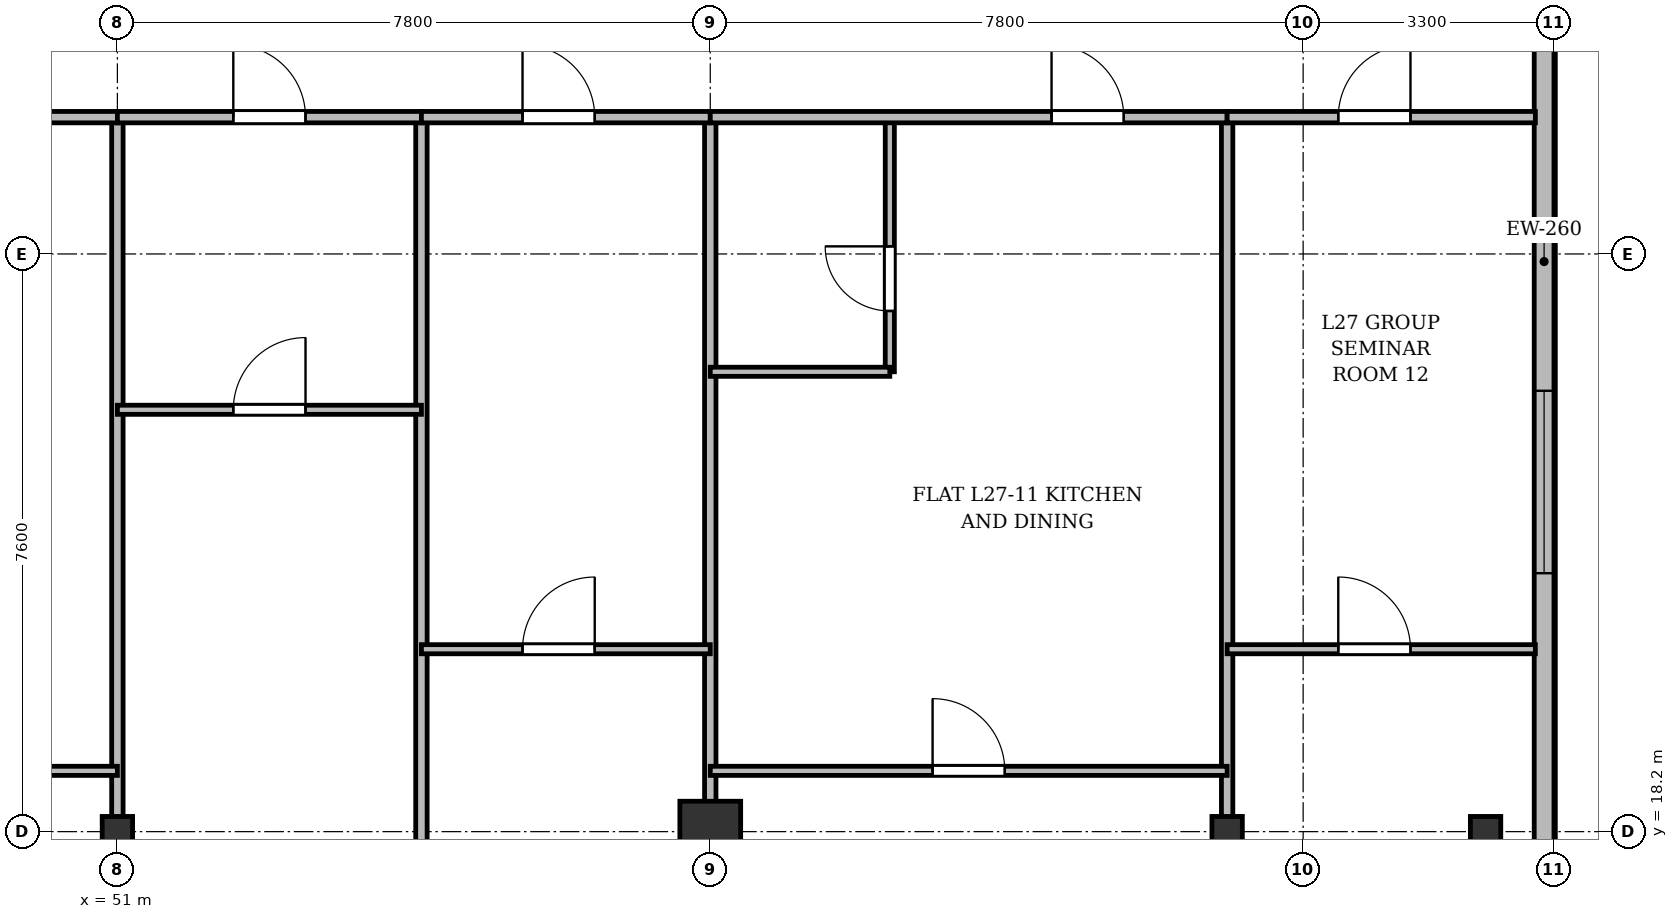
"""IFC4 building model, lengths in metres.
Left out: names, types, materials, properties, quantities, classifications, styles, units other than length and angle.
Written with IfcOpenShell. Run it as: python <this file> out.ifc"""

import sys

from ifc_helpers import new_model, si_unit, direction, frame, frame_2d, origin, origin_2d, place, context, subcontext, project, spatial, rectangle, i_section, extrude, source, transform, mapped, element, fill, save


model = new_model("IFC4")
c1 = context("Model", 3, precision=1e-05, world=origin(), true_north=direction((0.0, 1.0)))
c2 = subcontext(c1, "Body", "Model", "MODEL_VIEW")
j1 = project(units=[si_unit("LENGTHUNIT", "METRE"), si_unit("PLANEANGLEUNIT", "RADIAN")], contexts=[c1])
p1 = place(None, origin())
s1 = spatial("IfcSite", under=j1, at=p1, CompositionType="ELEMENT")
p2 = place(p1, origin())
s2 = spatial("IfcBuilding", under=s1, at=p2, CompositionType="ELEMENT")
p3 = place(p2, frame((0.0, 0.0, 106.9)))
s3 = spatial("IfcBuildingStorey", under=s2, at=p3, CompositionType="ELEMENT", Elevation=106.9)
m1 = source(origin(), c2, "Body", "SweptSolid", [
    extrude(i_section(OverallWidth=0.4, OverallDepth=0.4, WebThickness=0.022, FlangeThickness=0.035, at=origin_2d()), origin(), (0.0, 0.0, 1.0), 3.6),
])
p4 = place(p3, frame((51.0, 18.2, 0.0), z_axis=(0.0, 0.0, 1.0), x_axis=(1.0, 0.0, 0.0)))
e1 = element("IfcColumn", 1, at=p4, inside=s3, PredefinedType="COLUMN", context=c2, shape_type="MappedRepresentation", body=[
    mapped(m1, transform((0.0, 0.0, 0.0), x_axis=(1.0, 0.0, 0.0), y_axis=(0.0, 1.0, 0.0), z_axis=(0.0, 0.0, 1.0), scale=1.0)),
])
m2 = source(origin(), c2, "Body", "SweptSolid", [
    extrude(rectangle(XDim=0.8, YDim=0.8, at=origin_2d()), origin(), (0.0, 0.0, 1.0), 3.6),
])
p5 = place(p3, frame((58.8, 18.2, 0.0), z_axis=(0.0, 0.0, 1.0), x_axis=(1.0, 0.0, 0.0)))
e2 = element("IfcColumn", 2, at=p5, inside=s3, PredefinedType="COLUMN", context=c2, shape_type="MappedRepresentation", body=[
    mapped(m2, transform((0.0, 0.0, 0.0), x_axis=(1.0, 0.0, 0.0), y_axis=(0.0, 1.0, 0.0), z_axis=(0.0, 0.0, 1.0), scale=1.0)),
])
for number, where, z_axis, x_axis in (
    (3, (65.6, 18.2, 0.0), (0.0, 0.0, 1.0), (1.0, 0.0, 0.0)),
    (4, (69.0, 18.2, 0.0), (0.0, 0.0, 1.0), (1.0, 0.0, 0.0)),
):
    element("IfcColumn", number, at=place(p3, frame(where, z_axis=z_axis, x_axis=x_axis)), inside=s3, PredefinedType="COLUMN", context=c2, shape_type="MappedRepresentation", body=[
        mapped(m1, transform((0.0, 0.0, 0.0), x_axis=(1.0, 0.0, 0.0), y_axis=(0.0, 1.0, 0.0), z_axis=(0.0, 0.0, 1.0), scale=1.0)),
    ])
p6 = place(p3, frame((69.77, 45.5, 0.0), z_axis=(0.0, 0.0, 1.0), x_axis=(0.0, -1.0, 0.0)))
e5 = element("IfcWall", 5, at=p6, inside=s3, PredefinedType="SOLIDWALL", context=c2, shape_type="SweptSolid", body=[
    extrude(rectangle(XDim=39.6, YDim=0.26, at=frame_2d((19.8, 0.0))), origin(), (0.0, 0.0, 1.0), 3.34),
])
p7 = place(p6, frame((36.95, 0.0, 0.92)))
e6 = element("IfcOpeningElement", 6, at=p7, cuts=e5, PredefinedType="OPENING", context=c2, shape_type="SweptSolid", body=[
    extrude(rectangle(XDim=1.2, YDim=1.65, at=frame_2d((0.6, 0.825))), frame((0.0, 0.14, 0.0), z_axis=(0.0, -1.0, 0.0), x_axis=(1.0, 0.0, 0.0)), (0.0, 0.0, 1.0), 0.28),
])
p8 = place(p6, frame((32.9, 0.0, 0.92)))
e7 = element("IfcOpeningElement", 7, at=p8, cuts=e5, PredefinedType="OPENING", context=c2, shape_type="SweptSolid", body=[
    extrude(rectangle(XDim=2.4, YDim=2.1, at=frame_2d((1.2, 1.05))), frame((0.0, 0.14, 0.0), z_axis=(0.0, -1.0, 0.0), x_axis=(1.0, 0.0, 0.0)), (0.0, 0.0, 1.0), 0.28),
])
p9 = place(p6, frame((28.7, 0.0, 0.92)))
e8 = element("IfcOpeningElement", 8, at=p9, cuts=e5, PredefinedType="OPENING", context=c2, shape_type="SweptSolid", body=[
    extrude(rectangle(XDim=2.4, YDim=2.1, at=frame_2d((1.2, 1.05))), frame((0.0, 0.14, 0.0), z_axis=(0.0, -1.0, 0.0), x_axis=(1.0, 0.0, 0.0)), (0.0, 0.0, 1.0), 0.28),
])
p10 = place(p6, frame((21.5, 0.0, 0.92)))
e9 = element("IfcOpeningElement", 9, at=p10, cuts=e5, PredefinedType="OPENING", context=c2, shape_type="SweptSolid", body=[
    extrude(rectangle(XDim=2.4, YDim=2.1, at=frame_2d((1.2, 1.05))), frame((0.0, 0.14, 0.0), z_axis=(0.0, -1.0, 0.0), x_axis=(1.0, 0.0, 0.0)), (0.0, 0.0, 1.0), 0.28),
])
p11 = place(p6, frame((7.5, 0.0, 0.92)))
e10 = element("IfcOpeningElement", 10, at=p11, cuts=e5, PredefinedType="OPENING", context=c2, shape_type="SweptSolid", body=[
    extrude(rectangle(XDim=2.4, YDim=2.1, at=frame_2d((1.2, 1.05))), frame((0.0, 0.14, 0.0), z_axis=(0.0, -1.0, 0.0), x_axis=(1.0, 0.0, 0.0)), (0.0, 0.0, 1.0), 0.28),
])
p12 = place(p6, frame((4.5, 0.0, 0.92)))
e11 = element("IfcOpeningElement", 11, at=p12, cuts=e5, PredefinedType="OPENING", context=c2, shape_type="SweptSolid", body=[
    extrude(rectangle(XDim=1.2, YDim=1.65, at=frame_2d((0.6, 0.825))), frame((0.0, 0.14, 0.0), z_axis=(0.0, -1.0, 0.0), x_axis=(1.0, 0.0, 0.0)), (0.0, 0.0, 1.0), 0.28),
])
p13 = place(p6, frame((1.15, 0.0, 0.92)))
e12 = element("IfcOpeningElement", 12, at=p13, cuts=e5, PredefinedType="OPENING", context=c2, shape_type="SweptSolid", body=[
    extrude(rectangle(XDim=1.2, YDim=1.65, at=frame_2d((0.6, 0.825))), frame((0.0, 0.14, 0.0), z_axis=(0.0, -1.0, 0.0), x_axis=(1.0, 0.0, 0.0)), (0.0, 0.0, 1.0), 0.28),
])
p14 = place(p3, frame((51.0, 3.145, 0.0), z_axis=(0.0, 0.0, 1.0), x_axis=(0.0, 1.0, 0.0)))
e13 = element("IfcWall", 13, at=p14, inside=s3, PredefinedType="PARTITIONING", context=c2, shape_type="SweptSolid", body=[
    extrude(rectangle(XDim=24.455, YDim=0.15, at=frame_2d((12.228, 0.0))), origin(), (0.0, 0.0, 1.0), 2.84),
])
p15 = place(p3, frame((55.0, 3.145, 0.0), z_axis=(0.0, 0.0, 1.0), x_axis=(0.0, 1.0, 0.0)))
e14 = element("IfcWall", 14, at=p15, inside=s3, PredefinedType="PARTITIONING", context=c2, shape_type="SweptSolid", body=[
    extrude(rectangle(XDim=24.455, YDim=0.15, at=frame_2d((12.228, 0.0))), origin(), (0.0, 0.0, 1.0), 2.752),
])
for number, where, z_axis, x_axis in (
    (15, (58.8, 3.145, 0.0), (0.0, 0.0, 1.0), (0.0, 1.0, 0.0)),
    (16, (65.6, 3.145, 0.0), (0.0, 0.0, 1.0), (0.0, 1.0, 0.0)),
):
    element("IfcWall", number, at=place(p3, frame(where, z_axis=z_axis, x_axis=x_axis)), inside=s3, PredefinedType="PARTITIONING", context=c2, shape_type="SweptSolid", body=[
        extrude(rectangle(XDim=24.455, YDim=0.15, at=frame_2d((12.228, 0.0))), origin(), (0.0, 0.0, 1.0), 2.84),
    ])
p16 = place(p3, frame((43.8, 19.0, 0.0), z_axis=(0.0, 0.0, 1.0), x_axis=(1.0, 0.0, 0.0)))
e17 = element("IfcWall", 17, at=p16, inside=s3, PredefinedType="PARTITIONING", context=c2, shape_type="SweptSolid", body=[
    extrude(rectangle(XDim=7.2, YDim=0.12, at=frame_2d((3.6, 0.0))), origin(), (0.0, 0.0, 1.0), 2.84),
])
p17 = place(p16, frame((3.125, 0.0, 0.0)))
e18 = element("IfcOpeningElement", 18, at=p17, cuts=e17, PredefinedType="OPENING", context=c2, shape_type="SweptSolid", body=[
    extrude(rectangle(XDim=0.95, YDim=2.15, at=frame_2d((0.475, 1.075))), frame((0.0, 0.07, 0.0), z_axis=(0.0, -1.0, 0.0), x_axis=(1.0, 0.0, 0.0)), (0.0, 0.0, 1.0), 0.14),
])
p18 = place(p3, frame((43.8, 27.6, 0.0), z_axis=(0.0, 0.0, 1.0), x_axis=(1.0, 0.0, 0.0)))
e19 = element("IfcWall", 19, at=p18, inside=s3, PredefinedType="PARTITIONING", context=c2, shape_type="SweptSolid", body=[
    extrude(rectangle(XDim=7.2, YDim=0.15, at=frame_2d((3.6, 0.0))), origin(), (0.0, 0.0, 1.0), 2.84),
])
p19 = place(p18, frame((4.706, 0.0, 0.0)))
e20 = element("IfcOpeningElement", 20, at=p19, cuts=e19, PredefinedType="OPENING", context=c2, shape_type="SweptSolid", body=[
    extrude(rectangle(XDim=0.95, YDim=2.15, at=frame_2d((0.475, 1.075))), frame((0.0, 0.085, 0.0), z_axis=(0.0, -1.0, 0.0), x_axis=(1.0, 0.0, 0.0)), (0.0, 0.0, 1.0), 0.17),
])
p20 = place(p3, frame((51.0, 27.6, 0.0), z_axis=(0.0, 0.0, 1.0), x_axis=(1.0, 0.0, 0.0)))
e21 = element("IfcWall", 21, at=p20, inside=s3, PredefinedType="PARTITIONING", context=c2, shape_type="SweptSolid", body=[
    extrude(rectangle(XDim=4.0, YDim=0.15, at=frame_2d((2.0, 0.0))), origin(), (0.0, 0.0, 1.0), 2.84),
])
p21 = place(p20, frame((1.525, 0.0, 0.0)))
e22 = element("IfcOpeningElement", 22, at=p21, cuts=e21, PredefinedType="OPENING", context=c2, shape_type="SweptSolid", body=[
    extrude(rectangle(XDim=0.95, YDim=2.15, at=frame_2d((0.475, 1.075))), frame((0.0, 0.085, 0.0), z_axis=(0.0, -1.0, 0.0), x_axis=(1.0, 0.0, 0.0)), (0.0, 0.0, 1.0), 0.17),
])
p22 = place(p3, frame((51.0, 23.75, 0.0), z_axis=(0.0, 0.0, 1.0), x_axis=(1.0, 0.0, 0.0)))
e23 = element("IfcWall", 23, at=p22, inside=s3, PredefinedType="PARTITIONING", context=c2, shape_type="SweptSolid", body=[
    extrude(rectangle(XDim=4.0, YDim=0.12, at=frame_2d((2.0, 0.0))), origin(), (0.0, 0.0, 1.0), 2.84),
])
p23 = place(p22, frame((1.525, 0.0, 0.0)))
e24 = element("IfcOpeningElement", 24, at=p23, cuts=e23, PredefinedType="OPENING", context=c2, shape_type="SweptSolid", body=[
    extrude(rectangle(XDim=0.95, YDim=2.15, at=frame_2d((0.475, 1.075))), frame((0.0, 0.07, 0.0), z_axis=(0.0, -1.0, 0.0), x_axis=(1.0, 0.0, 0.0)), (0.0, 0.0, 1.0), 0.14),
])
p24 = place(p3, frame((55.0, 27.6, 0.0), z_axis=(0.0, 0.0, 1.0), x_axis=(1.0, 0.0, 0.0)))
e25 = element("IfcWall", 25, at=p24, inside=s3, PredefinedType="PARTITIONING", context=c2, shape_type="SweptSolid", body=[
    extrude(rectangle(XDim=3.8, YDim=0.15, at=frame_2d((1.9, 0.0))), origin(), (0.0, 0.0, 1.0), 2.84),
])
p25 = place(p24, frame((1.33, 0.0, 0.0)))
e26 = element("IfcOpeningElement", 26, at=p25, cuts=e25, PredefinedType="OPENING", context=c2, shape_type="SweptSolid", body=[
    extrude(rectangle(XDim=0.95, YDim=2.15, at=frame_2d((0.475, 1.075))), frame((0.0, 0.085, 0.0), z_axis=(0.0, -1.0, 0.0), x_axis=(1.0, 0.0, 0.0)), (0.0, 0.0, 1.0), 0.17),
])
p26 = place(p3, frame((55.0, 20.6, 0.0), z_axis=(0.0, 0.0, 1.0), x_axis=(1.0, 0.0, 0.0)))
e27 = element("IfcWall", 27, at=p26, inside=s3, PredefinedType="PARTITIONING", context=c2, shape_type="SweptSolid", body=[
    extrude(rectangle(XDim=3.8, YDim=0.12, at=frame_2d((1.9, 0.0))), origin(), (0.0, 0.0, 1.0), 2.84),
])
p27 = place(p26, frame((1.33, 0.0, 0.0)))
e28 = element("IfcOpeningElement", 28, at=p27, cuts=e27, PredefinedType="OPENING", context=c2, shape_type="SweptSolid", body=[
    extrude(rectangle(XDim=0.95, YDim=2.15, at=frame_2d((0.475, 1.075))), frame((0.0, 0.07, 0.0), z_axis=(0.0, -1.0, 0.0), x_axis=(1.0, 0.0, 0.0)), (0.0, 0.0, 1.0), 0.14),
])
p28 = place(p3, frame((58.8, 19.0, 0.0), z_axis=(0.0, 0.0, 1.0), x_axis=(1.0, 0.0, 0.0)))
e29 = element("IfcWall", 29, at=p28, inside=s3, PredefinedType="PARTITIONING", context=c2, shape_type="SweptSolid", body=[
    extrude(rectangle(XDim=6.8, YDim=0.12, at=frame_2d((3.4, 0.0))), origin(), (0.0, 0.0, 1.0), 2.84),
])
p29 = place(p28, frame((2.925, 0.0, 0.0)))
e30 = element("IfcOpeningElement", 30, at=p29, cuts=e29, PredefinedType="OPENING", context=c2, shape_type="SweptSolid", body=[
    extrude(rectangle(XDim=0.95, YDim=2.15, at=frame_2d((0.475, 1.075))), frame((0.0, 0.07, 0.0), z_axis=(0.0, -1.0, 0.0), x_axis=(1.0, 0.0, 0.0)), (0.0, 0.0, 1.0), 0.14),
])
p30 = place(p3, frame((61.162, 24.25, 0.0), z_axis=(0.0, 0.0, 1.0), x_axis=(0.0, 1.0, 0.0)))
e31 = element("IfcWall", 31, at=p30, inside=s3, PredefinedType="PARTITIONING", context=c2, shape_type="SweptSolid", body=[
    extrude(rectangle(XDim=3.35, YDim=0.12, at=frame_2d((1.675, 0.0))), origin(), (0.0, 0.0, 1.0), 2.99),
])
p31 = place(p30, frame((0.8, 0.0, 0.0)))
e32 = element("IfcOpeningElement", 32, at=p31, cuts=e31, PredefinedType="OPENING", context=c2, shape_type="SweptSolid", body=[
    extrude(rectangle(XDim=0.85, YDim=2.1, at=frame_2d((0.425, 1.05))), frame((0.0, 0.07, 0.0), z_axis=(0.0, -1.0, 0.0), x_axis=(1.0, 0.0, 0.0)), (0.0, 0.0, 1.0), 0.14),
])
p32 = place(p3, frame((58.8, 24.25, 0.0), z_axis=(0.0, 0.0, 1.0), x_axis=(1.0, 0.0, 0.0)))
e33 = element("IfcWall", 33, at=p32, inside=s3, PredefinedType="PARTITIONING", context=c2, shape_type="SweptSolid", body=[
    extrude(rectangle(XDim=2.362, YDim=0.12, at=frame_2d((1.181, 0.0))), origin(), (0.0, 0.0, 1.0), 2.84),
])
p33 = place(p3, frame((58.8, 27.6, 0.0), z_axis=(0.0, 0.0, 1.0), x_axis=(1.0, 0.0, 0.0)))
e34 = element("IfcWall", 34, at=p33, inside=s3, PredefinedType="PARTITIONING", context=c2, shape_type="SweptSolid", body=[
    extrude(rectangle(XDim=6.8, YDim=0.15, at=frame_2d((3.4, 0.0))), origin(), (0.0, 0.0, 1.0), 2.84),
])
p34 = place(p33, frame((4.49, 0.0, 0.0)))
e35 = element("IfcOpeningElement", 35, at=p34, cuts=e34, PredefinedType="OPENING", context=c2, shape_type="SweptSolid", body=[
    extrude(rectangle(XDim=0.95, YDim=2.15, at=frame_2d((0.475, 1.075))), frame((0.0, 0.085, 0.0), z_axis=(0.0, -1.0, 0.0), x_axis=(1.0, 0.0, 0.0)), (0.0, 0.0, 1.0), 0.17),
])
p35 = place(p3, frame((65.6, 27.6, 0.0), z_axis=(0.0, 0.0, 1.0), x_axis=(1.0, 0.0, 0.0)))
e36 = element("IfcWall", 36, at=p35, inside=s3, PredefinedType="PARTITIONING", context=c2, shape_type="SweptSolid", body=[
    extrude(rectangle(XDim=4.055, YDim=0.15, at=frame_2d((2.027, 0.0))), origin(), (0.0, 0.0, 1.0), 2.84),
])
p36 = place(p35, frame((1.462, 0.0, 0.0)))
e37 = element("IfcOpeningElement", 37, at=p36, cuts=e36, PredefinedType="OPENING", context=c2, shape_type="SweptSolid", body=[
    extrude(rectangle(XDim=0.95, YDim=2.15, at=frame_2d((0.475, 1.075))), frame((0.0, 0.085, 0.0), z_axis=(0.0, -1.0, 0.0), x_axis=(1.0, 0.0, 0.0)), (0.0, 0.0, 1.0), 0.17),
])
p37 = place(p3, frame((65.6, 20.6, 0.0), z_axis=(0.0, 0.0, 1.0), x_axis=(1.0, 0.0, 0.0)))
e38 = element("IfcWall", 38, at=p37, inside=s3, PredefinedType="PARTITIONING", context=c2, shape_type="SweptSolid", body=[
    extrude(rectangle(XDim=4.055, YDim=0.12, at=frame_2d((2.027, 0.0))), origin(), (0.0, 0.0, 1.0), 2.84),
])
p38 = place(p37, frame((1.462, 0.0, 0.0)))
e39 = element("IfcOpeningElement", 39, at=p38, cuts=e38, PredefinedType="OPENING", context=c2, shape_type="SweptSolid", body=[
    extrude(rectangle(XDim=0.95, YDim=2.15, at=frame_2d((0.475, 1.075))), frame((0.0, 0.07, 0.0), z_axis=(0.0, -1.0, 0.0), x_axis=(1.0, 0.0, 0.0)), (0.0, 0.0, 1.0), 0.14),
])
m3 = source(origin(), c2, "Body", "SweptSolid", [
    extrude(rectangle(XDim=2.4, YDim=2.1, at=frame_2d((1.2, 1.05))), frame((0.0, 0.03, 0.0), z_axis=(0.0, -1.0, 0.0), x_axis=(1.0, 0.0, 0.0)), (0.0, 0.0, 1.0), 0.06),
])
p39 = place(p10, origin())
e40 = element("IfcWindow", 40, at=p39, inside=s3, PartitioningType="SINGLE_PANEL", PredefinedType="WINDOW", context=c2, shape_type="MappedRepresentation", body=[
    mapped(m3, transform((0.0, 0.0, 0.0), x_axis=(1.0, 0.0, 0.0), y_axis=(0.0, 1.0, 0.0), z_axis=(0.0, 0.0, 1.0), scale=1.0)),
])
fill(e9, e40)
m4 = source(origin(), c2, "Body", "SweptSolid", [
    extrude(rectangle(XDim=0.95, YDim=2.15, at=frame_2d((0.475, 1.075))), frame((0.0, 0.025, 0.0), z_axis=(0.0, -1.0, 0.0), x_axis=(1.0, 0.0, 0.0)), (0.0, 0.0, 1.0), 0.05),
])
p40 = place(p21, origin())
e41 = element("IfcDoor", 41, at=p40, inside=s3, OperationType="SINGLE_SWING_LEFT", PredefinedType="DOOR", context=c2, shape_type="MappedRepresentation", body=[
    mapped(m4, transform((0.0, 0.0, 0.0), x_axis=(1.0, 0.0, 0.0), y_axis=(0.0, 1.0, 0.0), z_axis=(0.0, 0.0, 1.0), scale=1.0)),
])
fill(e22, e41)
p41 = place(p23, origin())
e42 = element("IfcDoor", 42, at=p41, inside=s3, OperationType="SINGLE_SWING_RIGHT", PredefinedType="DOOR", context=c2, shape_type="MappedRepresentation", body=[
    mapped(m4, transform((0.0, 0.0, 0.0), x_axis=(1.0, 0.0, 0.0), y_axis=(0.0, 1.0, 0.0), z_axis=(0.0, 0.0, 1.0), scale=1.0)),
])
fill(e24, e42)
p42 = place(p25, origin())
e43 = element("IfcDoor", 43, at=p42, inside=s3, OperationType="SINGLE_SWING_LEFT", PredefinedType="DOOR", context=c2, shape_type="MappedRepresentation", body=[
    mapped(m4, transform((0.0, 0.0, 0.0), x_axis=(1.0, 0.0, 0.0), y_axis=(0.0, 1.0, 0.0), z_axis=(0.0, 0.0, 1.0), scale=1.0)),
])
fill(e26, e43)
p43 = place(p27, origin())
e44 = element("IfcDoor", 44, at=p43, inside=s3, OperationType="SINGLE_SWING_RIGHT", PredefinedType="DOOR", context=c2, shape_type="MappedRepresentation", body=[
    mapped(m4, transform((0.0, 0.0, 0.0), x_axis=(1.0, 0.0, 0.0), y_axis=(0.0, 1.0, 0.0), z_axis=(0.0, 0.0, 1.0), scale=1.0)),
])
fill(e28, e44)
p44 = place(p29, origin())
e45 = element("IfcDoor", 45, at=p44, inside=s3, OperationType="SINGLE_SWING_LEFT", PredefinedType="DOOR", context=c2, shape_type="MappedRepresentation", body=[
    mapped(m4, transform((0.0, 0.0, 0.0), x_axis=(1.0, 0.0, 0.0), y_axis=(0.0, 1.0, 0.0), z_axis=(0.0, 0.0, 1.0), scale=1.0)),
])
fill(e30, e45)
m5 = source(origin(), c2, "Body", "SweptSolid", [
    extrude(rectangle(XDim=0.85, YDim=2.1, at=frame_2d((0.425, 1.05))), frame((0.0, 0.025, 0.0), z_axis=(0.0, -1.0, 0.0), x_axis=(1.0, 0.0, 0.0)), (0.0, 0.0, 1.0), 0.05),
])
p45 = place(p31, origin())
e46 = element("IfcDoor", 46, at=p45, inside=s3, OperationType="SINGLE_SWING_RIGHT", PredefinedType="DOOR", context=c2, shape_type="MappedRepresentation", body=[
    mapped(m5, transform((0.0, 0.0, 0.0), x_axis=(1.0, 0.0, 0.0), y_axis=(0.0, 1.0, 0.0), z_axis=(0.0, 0.0, 1.0), scale=1.0)),
])
fill(e32, e46)
p46 = place(p34, origin())
e47 = element("IfcDoor", 47, at=p46, inside=s3, OperationType="SINGLE_SWING_LEFT", PredefinedType="DOOR", context=c2, shape_type="MappedRepresentation", body=[
    mapped(m4, transform((0.0, 0.0, 0.0), x_axis=(1.0, 0.0, 0.0), y_axis=(0.0, 1.0, 0.0), z_axis=(0.0, 0.0, 1.0), scale=1.0)),
])
fill(e35, e47)
p47 = place(p36, origin())
e48 = element("IfcDoor", 48, at=p47, inside=s3, OperationType="SINGLE_SWING_RIGHT", PredefinedType="DOOR", context=c2, shape_type="MappedRepresentation", body=[
    mapped(m4, transform((0.0, 0.0, 0.0), x_axis=(1.0, 0.0, 0.0), y_axis=(0.0, 1.0, 0.0), z_axis=(0.0, 0.0, 1.0), scale=1.0)),
])
fill(e37, e48)
p48 = place(p38, origin())
e49 = element("IfcDoor", 49, at=p48, inside=s3, OperationType="SINGLE_SWING_LEFT", PredefinedType="DOOR", context=c2, shape_type="MappedRepresentation", body=[
    mapped(m4, transform((0.0, 0.0, 0.0), x_axis=(1.0, 0.0, 0.0), y_axis=(0.0, 1.0, 0.0), z_axis=(0.0, 0.0, 1.0), scale=1.0)),
])
fill(e39, e49)
save(model, sys.argv[1])
